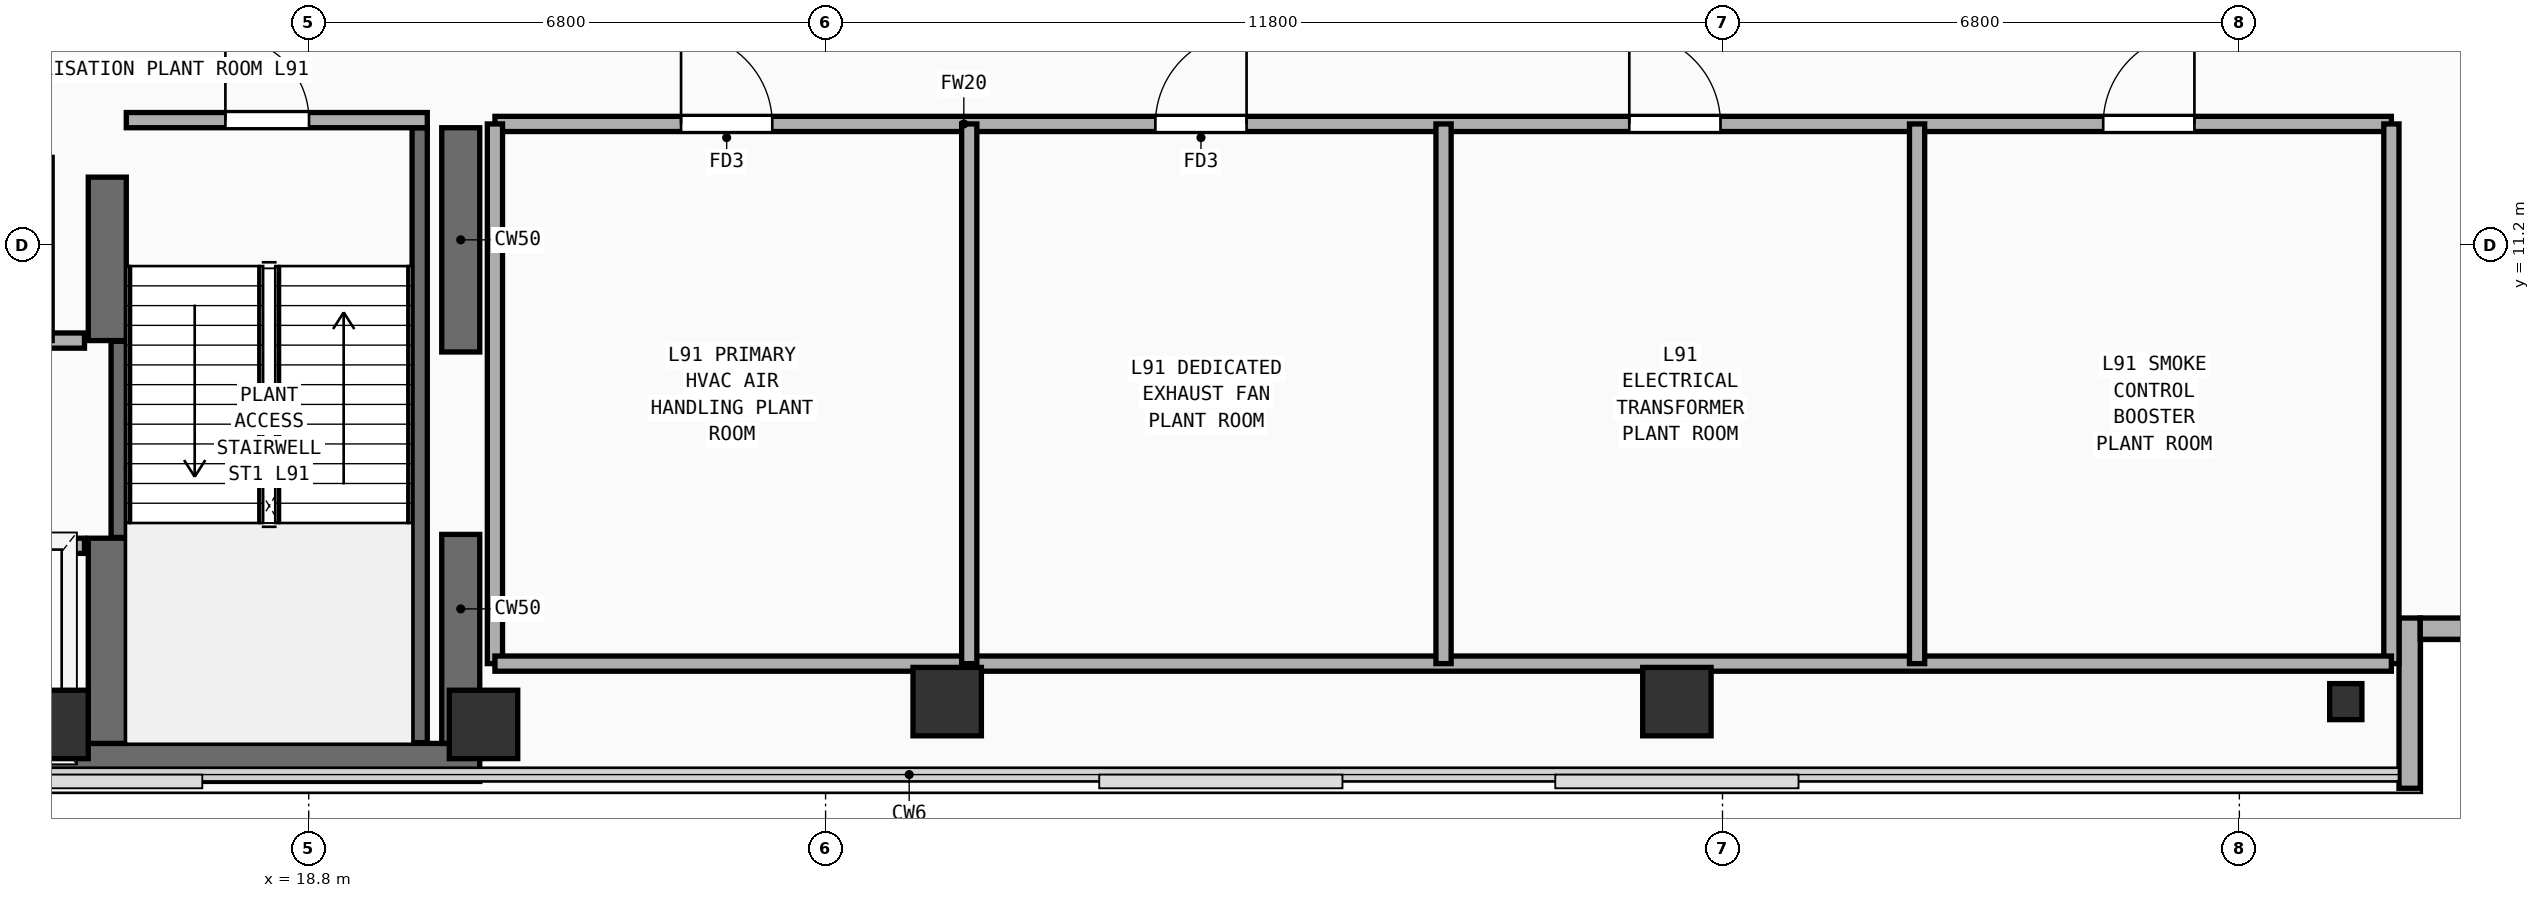
"""IFC4 building model, lengths in metres.
Left out: names, types, materials, properties, quantities, classifications, styles, units other than length and angle.
Written with IfcOpenShell. Run it as: python <this file> out.ifc"""

import sys

from ifc_helpers import new_model, si_unit, direction, frame, frame_2d, origin, origin_2d, place, context, subcontext, project, spatial, rectangle, i_section, extrude, element, fill, save


model = new_model("IFC4")
c1 = context("Model", 3, precision=1e-05, world=origin(), true_north=direction((0.0, 1.0)))
c2 = subcontext(c1, "Body", "Model", "MODEL_VIEW")
j1 = project(units=[si_unit("LENGTHUNIT", "METRE"), si_unit("PLANEANGLEUNIT", "RADIAN")], contexts=[c1])
p1 = place(None, origin())
s1 = spatial("IfcSite", under=j1, at=p1, CompositionType="ELEMENT")
p2 = place(p1, origin())
s2 = spatial("IfcBuilding", under=s1, at=p2, CompositionType="ELEMENT")
p3 = place(p2, frame((0.0, 0.0, 356.2)))
s3 = spatial("IfcBuildingStorey", under=s2, at=p3, CompositionType="ELEMENT", Elevation=356.2)
p4 = place(p3, frame((7.2, 4.4, 0.0), z_axis=(0.0, 0.0, 1.0), x_axis=(1.0, 0.0, 0.0)))
e1 = element("IfcWall", 1, at=p4, inside=s3, PredefinedType="SHEAR", context=c2, shape_type="SweptSolid", body=[
    extrude(rectangle(XDim=13.85, YDim=0.5, at=frame_2d((6.925, 0.0))), origin(), (0.0, 0.0, 1.0), 3.82),
])
p5 = place(p3, frame((20.8, 4.65, 0.0), z_axis=(0.0, 0.0, 1.0), x_axis=(0.0, 1.0, 0.0)))
e2 = element("IfcWall", 2, at=p5, inside=s3, PredefinedType="SHEAR", context=c2, shape_type="SweptSolid", body=[
    extrude(rectangle(XDim=2.75, YDim=0.5, at=frame_2d((1.375, 0.0))), origin(), (0.0, 0.0, 1.0), 3.82),
])
p6 = place(p3, frame((20.8, 9.8, 0.0), z_axis=(0.0, 0.0, 1.0), x_axis=(0.0, 1.0, 0.0)))
e3 = element("IfcWall", 3, at=p6, inside=s3, PredefinedType="SHEAR", context=c2, shape_type="SweptSolid", body=[
    extrude(rectangle(XDim=2.95, YDim=0.5, at=frame_2d((1.475, 0.0))), origin(), (0.0, 0.0, 1.0), 3.82),
])
p7 = place(p3, frame((16.15, 4.65, 0.0), z_axis=(0.0, 0.0, 1.0), x_axis=(0.0, 1.0, 0.0)))
e4 = element("IfcWall", 4, at=p7, inside=s3, PredefinedType="SHEAR", context=c2, shape_type="SweptSolid", body=[
    extrude(rectangle(XDim=2.7, YDim=0.5, at=frame_2d((1.35, 0.0))), origin(), (0.0, 0.0, 1.0), 3.82),
])
p8 = place(p3, frame((16.15, 9.95, 0.0), z_axis=(0.0, 0.0, 1.0), x_axis=(0.0, 1.0, 0.0)))
e5 = element("IfcWall", 5, at=p8, inside=s3, PredefinedType="SHEAR", context=c2, shape_type="SweptSolid", body=[
    extrude(rectangle(XDim=2.15, YDim=0.5, at=frame_2d((1.075, 0.0))), origin(), (0.0, 0.0, 1.0), 3.82),
])
for number, where, z_axis, x_axis in (
    (6, (15.45, 4.9, 0.0), (0.0, 0.0, 1.0), (1.0, 0.0, 0.0)),
    (7, (21.1, 4.9, 0.0), (0.0, 0.0, 1.0), (1.0, 0.0, 0.0)),
    (8, (27.2, 5.2, 0.0), (0.0, 0.0, 1.0), (1.0, 0.0, 0.0)),
    (9, (36.8, 5.2, 0.0), (0.0, 0.0, 1.0), (1.0, 0.0, 0.0)),
):
    element("IfcColumn", number, at=place(p3, frame(where, z_axis=z_axis, x_axis=x_axis)), inside=s3, PredefinedType="COLUMN", context=c2, shape_type="SweptSolid", body=[
        extrude(rectangle(XDim=0.9, YDim=0.9, at=origin_2d()), origin(), (0.0, 0.0, 1.0), 3.82),
    ])
p9 = place(p3, frame((45.6, 5.2, 0.0), z_axis=(0.0, 0.0, 1.0), x_axis=(1.0, 0.0, 0.0)))
e10 = element("IfcColumn", 10, at=p9, inside=s3, PredefinedType="COLUMN", context=c2, shape_type="SweptSolid", body=[
    extrude(i_section(OverallWidth=0.424, OverallDepth=0.474, WebThickness=0.043, FlangeThickness=0.07, FilletRadius=0.015, at=origin_2d()), origin(), (0.0, 0.0, 1.0), 3.82),
])
p10 = place(p3, frame((46.44, 4.06, 0.0), z_axis=(0.0, 0.0, 1.0), x_axis=(0.0, 1.0, 0.0)))
e11 = element("IfcWall", 11, at=p10, inside=s3, PredefinedType="SOLIDWALL", context=c2, shape_type="SweptSolid", body=[
    extrude(rectangle(XDim=2.24, YDim=0.28, at=frame_2d((1.12, 0.0))), origin(), (0.0, 0.0, 1.0), 3.82),
])
p11 = place(p3, frame((46.58, 6.16, 0.0), z_axis=(0.0, 0.0, 1.0), x_axis=(1.0, 0.0, 0.0)))
e12 = element("IfcWall", 12, at=p11, inside=s3, PredefinedType="SOLIDWALL", context=c2, shape_type="SweptSolid", body=[
    extrude(rectangle(XDim=1.96, YDim=0.28, at=frame_2d((0.98, 0.0))), origin(), (0.0, 0.0, 1.0), 3.82),
])
p12 = place(p3, frame((16.3, 7.36, 0.0), z_axis=(0.0, 0.0, 1.0), x_axis=(0.0, 1.0, 0.0)))
e13 = element("IfcWall", 13, at=p12, inside=s3, PredefinedType="SHEAR", context=c2, shape_type="SweptSolid", body=[
    extrude(rectangle(XDim=2.58, YDim=0.2, at=frame_2d((1.29, 0.0))), origin(), (0.0, 0.0, 1.0), 3.82),
])
p13 = place(p3, frame((20.26, 4.66, 0.0), z_axis=(0.0, 0.0, 1.0), x_axis=(0.0, 1.0, 0.0)))
e14 = element("IfcWall", 14, at=p13, inside=s3, PredefinedType="SHEAR", context=c2, shape_type="SweptSolid", body=[
    extrude(rectangle(XDim=8.09, YDim=0.2, at=frame_2d((4.045, 0.0))), origin(), (0.0, 0.0, 1.0), 3.82),
])
p14 = place(p3, frame((16.4, 12.85, 0.0), z_axis=(0.0, 0.0, 1.0), x_axis=(1.0, 0.0, 0.0)))
e15 = element("IfcWall", 15, at=p14, inside=s3, PredefinedType="PARTITIONING", context=c2, shape_type="SweptSolid", body=[
    extrude(rectangle(XDim=3.96, YDim=0.2, at=frame_2d((1.98, 0.0))), origin(), (0.0, 0.0, 1.0), 3.82),
])
p15 = place(p14, frame((1.304, 0.0, 0.0)))
e16 = element("IfcOpeningElement", 16, at=p15, cuts=e15, PredefinedType="OPENING", context=c2, shape_type="SweptSolid", body=[
    extrude(rectangle(XDim=1.1, YDim=2.2, at=frame_2d((0.55, 1.1))), frame((0.0, 0.11, 0.0), z_axis=(0.0, -1.0, 0.0), x_axis=(1.0, 0.0, 0.0)), (0.0, 0.0, 1.0), 0.22),
])
p16 = place(p3, frame((7.5, 7.25, 0.0), z_axis=(0.0, 0.0, 1.0), x_axis=(1.0, 0.0, 0.0)))
e17 = element("IfcWall", 17, at=p16, inside=s3, PredefinedType="PARTITIONING", context=c2, shape_type="SweptSolid", body=[
    extrude(rectangle(XDim=8.35, YDim=0.2, at=frame_2d((4.175, 0.0))), origin(), (0.0, 0.0, 1.0), 3.82),
])
p17 = place(p16, frame((0.53, 0.0, 0.0)))
e18 = element("IfcOpeningElement", 18, at=p17, cuts=e17, PredefinedType="OPENING", context=c2, shape_type="SweptSolid", body=[
    extrude(rectangle(XDim=1.1, YDim=2.2, at=frame_2d((0.55, 1.1))), frame((0.0, 0.11, 0.0), z_axis=(0.0, -1.0, 0.0), x_axis=(1.0, 0.0, 0.0)), (0.0, 0.0, 1.0), 0.22),
])
p18 = place(p16, frame((2.37, 0.0, 0.0)))
e19 = element("IfcOpeningElement", 19, at=p18, cuts=e17, PredefinedType="OPENING", context=c2, shape_type="SweptSolid", body=[
    extrude(rectangle(XDim=1.1, YDim=2.2, at=frame_2d((0.55, 1.1))), frame((0.0, 0.11, 0.0), z_axis=(0.0, -1.0, 0.0), x_axis=(1.0, 0.0, 0.0)), (0.0, 0.0, 1.0), 0.22),
])
p19 = place(p16, frame((4.33, 0.0, 0.0)))
e20 = element("IfcOpeningElement", 20, at=p19, cuts=e17, PredefinedType="OPENING", context=c2, shape_type="SweptSolid", body=[
    extrude(rectangle(XDim=1.1, YDim=2.2, at=frame_2d((0.55, 1.1))), frame((0.0, 0.11, 0.0), z_axis=(0.0, -1.0, 0.0), x_axis=(1.0, 0.0, 0.0)), (0.0, 0.0, 1.0), 0.22),
])
p20 = place(p16, frame((6.5, 0.0, 0.0)))
e21 = element("IfcOpeningElement", 21, at=p20, cuts=e17, PredefinedType="OPENING", context=c2, shape_type="SweptSolid", body=[
    extrude(rectangle(XDim=1.1, YDim=2.2, at=frame_2d((0.55, 1.1))), frame((0.0, 0.11, 0.0), z_axis=(0.0, -1.0, 0.0), x_axis=(1.0, 0.0, 0.0)), (0.0, 0.0, 1.0), 0.22),
])
p21 = place(p3, frame((7.5, 9.95, 0.0), z_axis=(0.0, 0.0, 1.0), x_axis=(1.0, 0.0, 0.0)))
e22 = element("IfcWall", 22, at=p21, inside=s3, PredefinedType="PARTITIONING", context=c2, shape_type="SweptSolid", body=[
    extrude(rectangle(XDim=8.35, YDim=0.2, at=frame_2d((4.175, 0.0))), origin(), (0.0, 0.0, 1.0), 3.82),
])
p22 = place(p3, frame((15.35, 9.95, 0.0), z_axis=(0.0, 0.0, 1.0), x_axis=(0.0, 1.0, 0.0)))
e23 = element("IfcWall", 23, at=p22, inside=s3, PredefinedType="PARTITIONING", context=c2, shape_type="SweptSolid", body=[
    extrude(rectangle(XDim=2.41, YDim=0.15, at=frame_2d((1.205, 0.0))), origin(), (0.0, 0.0, 1.0), 3.82),
])
p23 = place(p3, frame((21.25, 12.8, 0.0), z_axis=(0.0, 0.0, 1.0), x_axis=(1.0, 0.0, 0.0)))
e24 = element("IfcWall", 24, at=p23, inside=s3, PredefinedType="PARTITIONING", context=c2, shape_type="SweptSolid", body=[
    extrude(rectangle(XDim=24.95, YDim=0.2, at=frame_2d((12.475, 0.0))), origin(), (0.0, 0.0, 1.0), 3.82),
])
p24 = place(p23, frame((2.448, 0.0, 0.0)))
e25 = element("IfcOpeningElement", 25, at=p24, cuts=e24, PredefinedType="OPENING", context=c2, shape_type="SweptSolid", body=[
    extrude(rectangle(XDim=1.2, YDim=2.25, at=frame_2d((0.6, 1.125))), frame((0.0, 0.11, 0.0), z_axis=(0.0, -1.0, 0.0), x_axis=(1.0, 0.0, 0.0)), (0.0, 0.0, 1.0), 0.22),
])
p25 = place(p23, frame((8.689, 0.0, 0.0)))
e26 = element("IfcOpeningElement", 26, at=p25, cuts=e24, PredefinedType="OPENING", context=c2, shape_type="SweptSolid", body=[
    extrude(rectangle(XDim=1.2, YDim=2.25, at=frame_2d((0.6, 1.125))), frame((0.0, 0.11, 0.0), z_axis=(0.0, -1.0, 0.0), x_axis=(1.0, 0.0, 0.0)), (0.0, 0.0, 1.0), 0.22),
])
p26 = place(p23, frame((14.924, 0.0, 0.0)))
e27 = element("IfcOpeningElement", 27, at=p26, cuts=e24, PredefinedType="OPENING", context=c2, shape_type="SweptSolid", body=[
    extrude(rectangle(XDim=1.2, YDim=2.25, at=frame_2d((0.6, 1.125))), frame((0.0, 0.11, 0.0), z_axis=(0.0, -1.0, 0.0), x_axis=(1.0, 0.0, 0.0)), (0.0, 0.0, 1.0), 0.22),
])
p27 = place(p23, frame((21.159, 0.0, 0.0)))
e28 = element("IfcOpeningElement", 28, at=p27, cuts=e24, PredefinedType="OPENING", context=c2, shape_type="SweptSolid", body=[
    extrude(rectangle(XDim=1.2, YDim=2.25, at=frame_2d((0.6, 1.125))), frame((0.0, 0.11, 0.0), z_axis=(0.0, -1.0, 0.0), x_axis=(1.0, 0.0, 0.0)), (0.0, 0.0, 1.0), 0.22),
])
for number, where, z_axis, x_axis in (
    (29, (21.25, 5.7, 0.0), (0.0, 0.0, 1.0), (0.0, 1.0, 0.0)),
    (30, (46.2, 5.7, 0.0), (0.0, 0.0, 1.0), (0.0, 1.0, 0.0)),
):
    element("IfcWall", number, at=place(p3, frame(where, z_axis=z_axis, x_axis=x_axis)), inside=s3, PredefinedType="PARTITIONING", context=c2, shape_type="SweptSolid", body=[
        extrude(rectangle(XDim=7.1, YDim=0.2, at=frame_2d((3.55, 0.0))), origin(), (0.0, 0.0, 1.0), 3.82),
    ])
p28 = place(p3, frame((21.25, 5.7, 0.0), z_axis=(0.0, 0.0, 1.0), x_axis=(1.0, 0.0, 0.0)))
e31 = element("IfcWall", 31, at=p28, inside=s3, PredefinedType="PARTITIONING", context=c2, shape_type="SweptSolid", body=[
    extrude(rectangle(XDim=24.95, YDim=0.2, at=frame_2d((12.475, 0.0))), origin(), (0.0, 0.0, 1.0), 3.82),
])
p29 = place(p3, frame((27.49, 5.7, 0.0), z_axis=(0.0, 0.0, 1.0), x_axis=(0.0, 1.0, 0.0)))
e32 = element("IfcWall", 32, at=p29, inside=s3, PredefinedType="PARTITIONING", context=c2, shape_type="SweptSolid", body=[
    extrude(rectangle(XDim=7.1, YDim=0.2, at=frame_2d((3.55, 0.0))), origin(), (0.0, 0.0, 1.0), 3.22),
])
for number, where, z_axis, x_axis in (
    (33, (33.73, 5.7, 0.0), (0.0, 0.0, 1.0), (0.0, 1.0, 0.0)),
    (34, (39.96, 5.7, 0.0), (0.0, 0.0, 1.0), (0.0, 1.0, 0.0)),
):
    element("IfcWall", number, at=place(p3, frame(where, z_axis=z_axis, x_axis=x_axis)), inside=s3, PredefinedType="PARTITIONING", context=c2, shape_type="SweptSolid", body=[
        extrude(rectangle(XDim=7.1, YDim=0.2, at=frame_2d((3.55, 0.0))), origin(), (0.0, 0.0, 1.0), 3.82),
    ])
p30 = place(p15, frame((1.1, 0.0, 0.0), z_axis=(0.0, 0.0, 1.0), x_axis=(-1.0, 0.0, 0.0)))
e35 = element("IfcDoor", 35, at=p30, inside=s3, OperationType="SINGLE_SWING_RIGHT", PredefinedType="DOOR", context=c2, shape_type="SweptSolid", body=[
    extrude(rectangle(XDim=1.1, YDim=2.2, at=frame_2d((0.55, 1.1))), frame((0.0, 0.025, 0.0), z_axis=(0.0, -1.0, 0.0), x_axis=(1.0, 0.0, 0.0)), (0.0, 0.0, 1.0), 0.05),
])
fill(e16, e35)
p31 = place(p24, origin())
e36 = element("IfcDoor", 36, at=p31, inside=s3, OperationType="SINGLE_SWING_LEFT", PredefinedType="DOOR", context=c2, shape_type="SweptSolid", body=[
    extrude(rectangle(XDim=1.2, YDim=2.25, at=frame_2d((0.6, 1.125))), frame((0.0, 0.025, 0.0), z_axis=(0.0, -1.0, 0.0), x_axis=(1.0, 0.0, 0.0)), (0.0, 0.0, 1.0), 0.05),
])
fill(e25, e36)
p32 = place(p25, origin())
e37 = element("IfcDoor", 37, at=p32, inside=s3, OperationType="SINGLE_SWING_RIGHT", PredefinedType="DOOR", context=c2, shape_type="SweptSolid", body=[
    extrude(rectangle(XDim=1.2, YDim=2.25, at=frame_2d((0.6, 1.125))), frame((0.0, 0.025, 0.0), z_axis=(0.0, -1.0, 0.0), x_axis=(1.0, 0.0, 0.0)), (0.0, 0.0, 1.0), 0.05),
])
fill(e26, e37)
p33 = place(p26, origin())
e38 = element("IfcDoor", 38, at=p33, inside=s3, OperationType="SINGLE_SWING_LEFT", PredefinedType="DOOR", context=c2, shape_type="SweptSolid", body=[
    extrude(rectangle(XDim=1.2, YDim=2.25, at=frame_2d((0.6, 1.125))), frame((0.0, 0.025, 0.0), z_axis=(0.0, -1.0, 0.0), x_axis=(1.0, 0.0, 0.0)), (0.0, 0.0, 1.0), 0.05),
])
fill(e27, e38)
p34 = place(p27, origin())
e39 = element("IfcDoor", 39, at=p34, inside=s3, OperationType="SINGLE_SWING_RIGHT", PredefinedType="DOOR", context=c2, shape_type="SweptSolid", body=[
    extrude(rectangle(XDim=1.2, YDim=2.25, at=frame_2d((0.6, 1.125))), frame((0.0, 0.025, 0.0), z_axis=(0.0, -1.0, 0.0), x_axis=(1.0, 0.0, 0.0)), (0.0, 0.0, 1.0), 0.05),
])
fill(e28, e39)
save(model, sys.argv[1])
